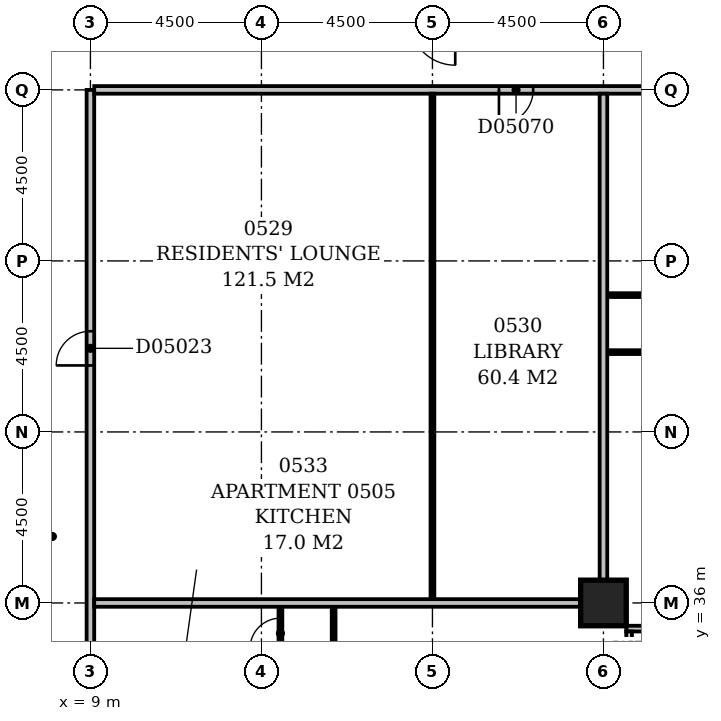
"""IFC4 building model, lengths in metres.
Left out: names, types, materials, properties, quantities, classifications, styles, units other than length and angle.
Written with IfcOpenShell. Run it as: python <this file> out.ifc"""

import sys

from ifc_helpers import new_model, si_unit, direction, frame, frame_2d, origin, origin_2d, place, context, subcontext, project, spatial, rectangle, extrude, element, fill, save


model = new_model("IFC4")
c1 = context("Model", 3, precision=1e-05, world=origin(), true_north=direction((0.0, 1.0)))
c2 = subcontext(c1, "Body", "Model", "MODEL_VIEW")
j1 = project(units=[si_unit("LENGTHUNIT", "METRE"), si_unit("PLANEANGLEUNIT", "RADIAN")], contexts=[c1])
p1 = place(None, origin())
s1 = spatial("IfcSite", under=j1, at=p1, CompositionType="ELEMENT")
p2 = place(p1, origin())
s2 = spatial("IfcBuilding", under=s1, at=p2, CompositionType="ELEMENT")
p3 = place(p2, frame((0.0, 0.0, 29.0)))
s3 = spatial("IfcBuildingStorey", under=s2, at=p3, CompositionType="ELEMENT", Elevation=29.0)
p4 = place(p3, frame((22.5, 36.0, -0.3), z_axis=(0.0, 0.0, 1.0), x_axis=(1.0, 0.0, 0.0)))
e1 = element("IfcColumn", 1, at=p4, inside=s3, PredefinedType="COLUMN", context=c2, shape_type="SweptSolid", body=[
    extrude(rectangle(XDim=1.2, YDim=1.2, at=origin_2d()), origin(), (0.0, 0.0, 1.0), 3.6),
])
p5 = place(p3, frame((23.175, 17.4, 0.0), z_axis=(0.0, 0.0, 1.0), x_axis=(0.0, 1.0, 0.0)))
e2 = element("IfcWall", 2, at=p5, inside=s3, PredefinedType="STANDARD", context=c2, shape_type="SweptSolid", body=[
    extrude(rectangle(XDim=17.85, YDim=0.15, at=frame_2d((8.925, 0.0))), origin(), (0.0, 0.0, 1.0), 2.7),
])
p6 = place(p5, frame((1.65, 0.0, 0.6)))
e3 = element("IfcOpeningElement", 3, at=p6, cuts=e2, PredefinedType="OPENING", context=c2, shape_type="SweptSolid", body=[
    extrude(rectangle(XDim=2.4, YDim=1.8, at=frame_2d((1.2, 0.9))), frame((0.0, 0.087, 0.0), z_axis=(0.0, -1.0, 0.0), x_axis=(1.0, 0.0, 0.0)), (0.0, 0.0, 1.0), 0.174),
])
p7 = place(p5, frame((6.15, 0.0, 0.6)))
e4 = element("IfcOpeningElement", 4, at=p7, cuts=e2, PredefinedType="OPENING", context=c2, shape_type="SweptSolid", body=[
    extrude(rectangle(XDim=2.4, YDim=1.8, at=frame_2d((1.2, 0.9))), frame((0.0, 0.087, 0.0), z_axis=(0.0, -1.0, 0.0), x_axis=(1.0, 0.0, 0.0)), (0.0, 0.0, 1.0), 0.174),
])
p8 = place(p5, frame((10.65, 0.0, 0.6)))
e5 = element("IfcOpeningElement", 5, at=p8, cuts=e2, PredefinedType="OPENING", context=c2, shape_type="SweptSolid", body=[
    extrude(rectangle(XDim=2.4, YDim=1.8, at=frame_2d((1.2, 0.9))), frame((0.0, 0.087, 0.0), z_axis=(0.0, -1.0, 0.0), x_axis=(1.0, 0.0, 0.0)), (0.0, 0.0, 1.0), 0.174),
])
p9 = place(p5, frame((17.138, 0.0, 0.6)))
e6 = element("IfcOpeningElement", 6, at=p9, cuts=e2, PredefinedType="OPENING", context=c2, shape_type="SweptSolid", body=[
    extrude(rectangle(XDim=0.45, YDim=1.8, at=frame_2d((0.225, 0.9))), frame((0.0, 0.087, 0.0), z_axis=(0.0, -1.0, 0.0), x_axis=(1.0, 0.0, 0.0)), (0.0, 0.0, 1.0), 0.174),
])
p10 = place(p3, frame((23.1, 35.325, 0.0), z_axis=(0.0, 0.0, 1.0), x_axis=(1.0, 0.0, 0.0)))
e7 = element("IfcWall", 7, at=p10, inside=s3, PredefinedType="STANDARD", context=c2, shape_type="SweptSolid", body=[
    extrude(rectangle(XDim=45.15, YDim=0.15, at=frame_2d((22.575, 0.0))), origin(), (0.0, 0.0, 1.0), 2.7),
])
p11 = place(p10, frame((0.45, 0.0, 0.6)))
e8 = element("IfcOpeningElement", 8, at=p11, cuts=e7, PredefinedType="OPENING", context=c2, shape_type="SweptSolid", body=[
    extrude(rectangle(XDim=2.4, YDim=1.8, at=frame_2d((1.2, 0.9))), frame((0.0, 0.087, 0.0), z_axis=(0.0, -1.0, 0.0), x_axis=(1.0, 0.0, 0.0)), (0.0, 0.0, 1.0), 0.174),
])
p12 = place(p10, frame((4.95, 0.0, 0.6)))
e9 = element("IfcOpeningElement", 9, at=p12, cuts=e7, PredefinedType="OPENING", context=c2, shape_type="SweptSolid", body=[
    extrude(rectangle(XDim=2.4, YDim=1.8, at=frame_2d((1.2, 0.9))), frame((0.0, 0.087, 0.0), z_axis=(0.0, -1.0, 0.0), x_axis=(1.0, 0.0, 0.0)), (0.0, 0.0, 1.0), 0.174),
])
p13 = place(p10, frame((9.25, 0.0, 0.6)))
e10 = element("IfcOpeningElement", 10, at=p13, cuts=e7, PredefinedType="OPENING", context=c2, shape_type="SweptSolid", body=[
    extrude(rectangle(XDim=1.5, YDim=1.8, at=frame_2d((0.75, 0.9))), frame((0.0, 0.087, 0.0), z_axis=(0.0, -1.0, 0.0), x_axis=(1.0, 0.0, 0.0)), (0.0, 0.0, 1.0), 0.174),
])
p14 = place(p10, frame((15.277, 0.0, 0.6)))
e11 = element("IfcOpeningElement", 11, at=p14, cuts=e7, PredefinedType="OPENING", context=c2, shape_type="SweptSolid", body=[
    extrude(rectangle(XDim=1.2, YDim=1.8, at=frame_2d((0.6, 0.9))), frame((0.0, 0.087, 0.0), z_axis=(0.0, -1.0, 0.0), x_axis=(1.0, 0.0, 0.0)), (0.0, 0.0, 1.0), 0.174),
])
p15 = place(p10, frame((18.45, 0.0, 0.6)))
e12 = element("IfcOpeningElement", 12, at=p15, cuts=e7, PredefinedType="OPENING", context=c2, shape_type="SweptSolid", body=[
    extrude(rectangle(XDim=2.4, YDim=1.8, at=frame_2d((1.2, 0.9))), frame((0.0, 0.087, 0.0), z_axis=(0.0, -1.0, 0.0), x_axis=(1.0, 0.0, 0.0)), (0.0, 0.0, 1.0), 0.174),
])
p16 = place(p10, frame((22.95, 0.0, 0.6)))
e13 = element("IfcOpeningElement", 13, at=p16, cuts=e7, PredefinedType="OPENING", context=c2, shape_type="SweptSolid", body=[
    extrude(rectangle(XDim=2.4, YDim=1.8, at=frame_2d((1.2, 0.9))), frame((0.0, 0.087, 0.0), z_axis=(0.0, -1.0, 0.0), x_axis=(1.0, 0.0, 0.0)), (0.0, 0.0, 1.0), 0.174),
])
p17 = place(p10, frame((27.45, 0.0, 0.6)))
e14 = element("IfcOpeningElement", 14, at=p17, cuts=e7, PredefinedType="OPENING", context=c2, shape_type="SweptSolid", body=[
    extrude(rectangle(XDim=2.4, YDim=1.8, at=frame_2d((1.2, 0.9))), frame((0.0, 0.087, 0.0), z_axis=(0.0, -1.0, 0.0), x_axis=(1.0, 0.0, 0.0)), (0.0, 0.0, 1.0), 0.174),
])
p18 = place(p10, frame((31.95, 0.0, 0.6)))
e15 = element("IfcOpeningElement", 15, at=p18, cuts=e7, PredefinedType="OPENING", context=c2, shape_type="SweptSolid", body=[
    extrude(rectangle(XDim=2.4, YDim=1.8, at=frame_2d((1.2, 0.9))), frame((0.0, 0.087, 0.0), z_axis=(0.0, -1.0, 0.0), x_axis=(1.0, 0.0, 0.0)), (0.0, 0.0, 1.0), 0.174),
])
p19 = place(p10, frame((36.45, 0.0, 0.6)))
e16 = element("IfcOpeningElement", 16, at=p19, cuts=e7, PredefinedType="OPENING", context=c2, shape_type="SweptSolid", body=[
    extrude(rectangle(XDim=2.4, YDim=1.8, at=frame_2d((1.2, 0.9))), frame((0.0, 0.087, 0.0), z_axis=(0.0, -1.0, 0.0), x_axis=(1.0, 0.0, 0.0)), (0.0, 0.0, 1.0), 0.174),
])
p20 = place(p10, frame((40.797, 0.0, 0.6)))
e17 = element("IfcOpeningElement", 17, at=p20, cuts=e7, PredefinedType="OPENING", context=c2, shape_type="SweptSolid", body=[
    extrude(rectangle(XDim=0.6, YDim=1.8, at=frame_2d((0.3, 0.9))), frame((0.0, 0.087, 0.0), z_axis=(0.0, -1.0, 0.0), x_axis=(1.0, 0.0, 0.0)), (0.0, 0.0, 1.0), 0.174),
])
p21 = place(p3, frame((9.0, 5.0, 0.0), z_axis=(0.0, 0.0, 1.0), x_axis=(0.0, 1.0, 0.0)))
e18 = element("IfcWall", 18, at=p21, inside=s3, PredefinedType="PARTITIONING", context=c2, shape_type="SweptSolid", body=[
    extrude(rectangle(XDim=44.5, YDim=0.2, at=frame_2d((22.25, 0.0))), origin(), (0.0, 0.0, 1.0), 3.3),
])
p22 = place(p21, frame((24.7, 0.0, 0.0)))
e19 = element("IfcOpeningElement", 19, at=p22, cuts=e18, PredefinedType="OPENING", context=c2, shape_type="SweptSolid", body=[
    extrude(rectangle(XDim=1.0, YDim=2.1, at=frame_2d((0.5, 1.05))), frame((0.0, 0.112, 0.0), z_axis=(0.0, -1.0, 0.0), x_axis=(1.0, 0.0, 0.0)), (0.0, 0.0, 1.0), 0.224),
])
p23 = place(p21, frame((13.3, 0.0, 0.0)))
e20 = element("IfcOpeningElement", 20, at=p23, cuts=e18, PredefinedType="OPENING", context=c2, shape_type="SweptSolid", body=[
    extrude(rectangle(XDim=1.0, YDim=2.1, at=frame_2d((0.5, 1.05))), frame((0.0, 0.112, 0.0), z_axis=(0.0, -1.0, 0.0), x_axis=(1.0, 0.0, 0.0)), (0.0, 0.0, 1.0), 0.224),
])
p24 = place(p21, frame((10.45, 0.0, 0.0)))
e21 = element("IfcOpeningElement", 21, at=p24, cuts=e18, PredefinedType="OPENING", context=c2, shape_type="SweptSolid", body=[
    extrude(rectangle(XDim=1.0, YDim=2.1, at=frame_2d((0.5, 1.05))), frame((0.0, 0.112, 0.0), z_axis=(0.0, -1.0, 0.0), x_axis=(1.0, 0.0, 0.0)), (0.0, 0.0, 1.0), 0.224),
])
p25 = place(p21, frame((5.95, 0.0, 0.0)))
e22 = element("IfcOpeningElement", 22, at=p25, cuts=e18, PredefinedType="OPENING", context=c2, shape_type="SweptSolid", body=[
    extrude(rectangle(XDim=1.0, YDim=2.1, at=frame_2d((0.5, 1.05))), frame((0.0, 0.112, 0.0), z_axis=(0.0, -1.0, 0.0), x_axis=(1.0, 0.0, 0.0)), (0.0, 0.0, 1.0), 0.224),
])
p26 = place(p21, frame((37.25, 0.0, 0.0)))
e23 = element("IfcOpeningElement", 23, at=p26, cuts=e18, PredefinedType="OPENING", context=c2, shape_type="SweptSolid", body=[
    extrude(rectangle(XDim=0.9, YDim=2.1, at=frame_2d((0.45, 1.05))), frame((0.0, 0.112, 0.0), z_axis=(0.0, -1.0, 0.0), x_axis=(1.0, 0.0, 0.0)), (0.0, 0.0, 1.0), 0.224),
])
p27 = place(p21, frame((1.5, 0.0, 0.0)))
e24 = element("IfcOpeningElement", 24, at=p27, cuts=e18, PredefinedType="OPENING", context=c2, shape_type="SweptSolid", body=[
    extrude(rectangle(XDim=0.9, YDim=2.1, at=frame_2d((0.45, 1.05))), frame((0.0, 0.112, 0.0), z_axis=(0.0, -1.0, 0.0), x_axis=(1.0, 0.0, 0.0)), (0.0, 0.0, 1.0), 0.224),
])
p28 = place(p3, frame((15.4, 27.1, 0.0), z_axis=(0.0, 0.0, 1.0), x_axis=(0.0, 1.0, 0.0)))
e25 = element("IfcWall", 25, at=p28, inside=s3, PredefinedType="PARTITIONING", context=c2, shape_type="SweptSolid", body=[
    extrude(rectangle(XDim=8.8, YDim=0.1, at=frame_2d((4.4, 0.0))), origin(), (0.0, 0.0, 1.0), 3.3),
])
p29 = place(p28, frame((1.7, 0.0, 0.0)))
e26 = element("IfcOpeningElement", 26, at=p29, cuts=e25, PredefinedType="OPENING", context=c2, shape_type="SweptSolid", body=[
    extrude(rectangle(XDim=0.9, YDim=2.1, at=frame_2d((0.45, 1.05))), frame((0.0, 0.062, 0.0), z_axis=(0.0, -1.0, 0.0), x_axis=(1.0, 0.0, 0.0)), (0.0, 0.0, 1.0), 0.124),
])
p30 = place(p28, frame((6.2, 0.0, 0.0)))
e27 = element("IfcOpeningElement", 27, at=p30, cuts=e25, PredefinedType="OPENING", context=c2, shape_type="SweptSolid", body=[
    extrude(rectangle(XDim=0.9, YDim=2.1, at=frame_2d((0.45, 1.05))), frame((0.0, 0.062, 0.0), z_axis=(0.0, -1.0, 0.0), x_axis=(1.0, 0.0, 0.0)), (0.0, 0.0, 1.0), 0.124),
])
p31 = place(p3, frame((14.0, 31.0, 0.0), z_axis=(0.0, 0.0, 1.0), x_axis=(0.0, 1.0, 0.0)))
e28 = element("IfcWall", 28, at=p31, inside=s3, PredefinedType="PARTITIONING", context=c2, shape_type="SweptSolid", body=[
    extrude(rectangle(XDim=4.9, YDim=0.1, at=frame_2d((2.45, 0.0))), origin(), (0.0, 0.0, 1.0), 3.3),
])
p32 = place(p31, frame((1.25, 0.0, 0.0)))
e29 = element("IfcOpeningElement", 29, at=p32, cuts=e28, PredefinedType="OPENING", context=c2, shape_type="SweptSolid", body=[
    extrude(rectangle(XDim=0.9, YDim=2.1, at=frame_2d((0.45, 1.05))), frame((0.0, 0.062, 0.0), z_axis=(0.0, -1.0, 0.0), x_axis=(1.0, 0.0, 0.0)), (0.0, 0.0, 1.0), 0.124),
])
p33 = place(p31, frame((3.8, 0.0, 0.0)))
e30 = element("IfcOpeningElement", 30, at=p33, cuts=e28, PredefinedType="OPENING", context=c2, shape_type="SweptSolid", body=[
    extrude(rectangle(XDim=0.8, YDim=2.1, at=frame_2d((0.4, 1.05))), frame((0.0, 0.062, 0.0), z_axis=(0.0, -1.0, 0.0), x_axis=(1.0, 0.0, 0.0)), (0.0, 0.0, 1.0), 0.124),
])
p34 = place(p3, frame((9.1, 36.0, 0.0), z_axis=(0.0, 0.0, 1.0), x_axis=(1.0, 0.0, 0.0)))
e31 = element("IfcWall", 31, at=p34, inside=s3, PredefinedType="PARTITIONING", context=c2, shape_type="SweptSolid", body=[
    extrude(rectangle(XDim=12.8, YDim=0.2, at=frame_2d((6.4, 0.0))), origin(), (0.0, 0.0, 1.0), 2.4),
])
p35 = place(p3, frame((18.0, 36.1, 0.0), z_axis=(0.0, 0.0, 1.0), x_axis=(0.0, 1.0, 0.0)))
e32 = element("IfcWall", 32, at=p35, inside=s3, PredefinedType="PARTITIONING", context=c2, shape_type="SweptSolid", body=[
    extrude(rectangle(XDim=13.3, YDim=0.1, at=frame_2d((6.65, 0.0))), origin(), (0.0, 0.0, 1.0), 3.3),
])
p36 = place(p3, frame((22.5, 36.6, 0.0), z_axis=(0.0, 0.0, 1.0), x_axis=(0.0, 1.0, 0.0)))
e33 = element("IfcWall", 33, at=p36, inside=s3, PredefinedType="PARTITIONING", context=c2, shape_type="SweptSolid", body=[
    extrude(rectangle(XDim=12.8, YDim=0.2, at=frame_2d((6.4, 0.0))), origin(), (0.0, 0.0, 1.0), 3.3),
])
p37 = place(p3, frame((22.6, 42.6, 0.0), z_axis=(0.0, 0.0, 1.0), x_axis=(1.0, 0.0, 0.0)))
e34 = element("IfcWall", 34, at=p37, inside=s3, PredefinedType="PARTITIONING", context=c2, shape_type="SweptSolid", body=[
    extrude(rectangle(XDim=17.8, YDim=0.1, at=frame_2d((8.9, 0.0))), origin(), (0.0, 0.0, 1.0), 3.3),
])
p38 = place(p37, frame((3.9, 0.0, 0.0)))
e35 = element("IfcOpeningElement", 35, at=p38, cuts=e34, PredefinedType="OPENING", context=c2, shape_type="SweptSolid", body=[
    extrude(rectangle(XDim=0.9, YDim=2.1, at=frame_2d((0.45, 1.05))), frame((0.0, 0.062, 0.0), z_axis=(0.0, -1.0, 0.0), x_axis=(1.0, 0.0, 0.0)), (0.0, 0.0, 1.0), 0.124),
])
p39 = place(p37, frame((10.7, 0.0, 0.0)))
e36 = element("IfcOpeningElement", 36, at=p39, cuts=e34, PredefinedType="OPENING", context=c2, shape_type="SweptSolid", body=[
    extrude(rectangle(XDim=0.9, YDim=2.1, at=frame_2d((0.45, 1.05))), frame((0.0, 0.062, 0.0), z_axis=(0.0, -1.0, 0.0), x_axis=(1.0, 0.0, 0.0)), (0.0, 0.0, 1.0), 0.124),
])
p40 = place(p37, frame((14.05, 0.0, 0.0)))
e37 = element("IfcOpeningElement", 37, at=p40, cuts=e34, PredefinedType="OPENING", context=c2, shape_type="SweptSolid", body=[
    extrude(rectangle(XDim=0.9, YDim=2.1, at=frame_2d((0.45, 1.05))), frame((0.0, 0.062, 0.0), z_axis=(0.0, -1.0, 0.0), x_axis=(1.0, 0.0, 0.0)), (0.0, 0.0, 1.0), 0.124),
])
p41 = place(p3, frame((22.6, 44.1, 0.0), z_axis=(0.0, 0.0, 1.0), x_axis=(1.0, 0.0, 0.0)))
e38 = element("IfcWall", 38, at=p41, inside=s3, PredefinedType="PARTITIONING", context=c2, shape_type="SweptSolid", body=[
    extrude(rectangle(XDim=6.75, YDim=0.1, at=frame_2d((3.375, 0.0))), origin(), (0.0, 0.0, 1.0), 3.3),
])
p42 = place(p41, frame((2.9, 0.0, 0.0)))
e39 = element("IfcOpeningElement", 39, at=p42, cuts=e38, PredefinedType="OPENING", context=c2, shape_type="SweptSolid", body=[
    extrude(rectangle(XDim=0.9, YDim=2.1, at=frame_2d((0.45, 1.05))), frame((0.0, 0.062, 0.0), z_axis=(0.0, -1.0, 0.0), x_axis=(1.0, 0.0, 0.0)), (0.0, 0.0, 1.0), 0.124),
])
p43 = place(p3, frame((9.1, 49.5, 0.0), z_axis=(0.0, 0.0, 1.0), x_axis=(1.0, 0.0, 0.0)))
e40 = element("IfcWall", 40, at=p43, inside=s3, PredefinedType="PARTITIONING", context=c2, shape_type="SweptSolid", body=[
    extrude(rectangle(XDim=57.8, YDim=0.2, at=frame_2d((28.9, 0.0))), origin(), (0.0, 0.0, 1.0), 3.3),
])
p44 = place(p43, frame((20.6, 0.0, 0.0)))
e41 = element("IfcOpeningElement", 41, at=p44, cuts=e40, PredefinedType="OPENING", context=c2, shape_type="SweptSolid", body=[
    extrude(rectangle(XDim=1.0, YDim=2.1, at=frame_2d((0.5, 1.05))), frame((0.0, 0.112, 0.0), z_axis=(0.0, -1.0, 0.0), x_axis=(1.0, 0.0, 0.0)), (0.0, 0.0, 1.0), 0.224),
])
p45 = place(p43, frame((31.7, 0.0, 0.0)))
e42 = element("IfcOpeningElement", 42, at=p45, cuts=e40, PredefinedType="OPENING", context=c2, shape_type="SweptSolid", body=[
    extrude(rectangle(XDim=1.0, YDim=2.1, at=frame_2d((0.5, 1.05))), frame((0.0, 0.112, 0.0), z_axis=(0.0, -1.0, 0.0), x_axis=(1.0, 0.0, 0.0)), (0.0, 0.0, 1.0), 0.224),
])
p46 = place(p43, frame((47.6, 0.0, 0.0)))
e43 = element("IfcOpeningElement", 43, at=p46, cuts=e40, PredefinedType="OPENING", context=c2, shape_type="SweptSolid", body=[
    extrude(rectangle(XDim=1.0, YDim=2.1, at=frame_2d((0.5, 1.05))), frame((0.0, 0.112, 0.0), z_axis=(0.0, -1.0, 0.0), x_axis=(1.0, 0.0, 0.0)), (0.0, 0.0, 1.0), 0.224),
])
p47 = place(p43, frame((54.15, 0.0, 0.0)))
e44 = element("IfcOpeningElement", 44, at=p47, cuts=e40, PredefinedType="OPENING", context=c2, shape_type="SweptSolid", body=[
    extrude(rectangle(XDim=1.0, YDim=2.1, at=frame_2d((0.5, 1.05))), frame((0.0, 0.112, 0.0), z_axis=(0.0, -1.0, 0.0), x_axis=(1.0, 0.0, 0.0)), (0.0, 0.0, 1.0), 0.224),
])
p48 = place(p43, frame((10.65, 0.0, 0.0)))
e45 = element("IfcOpeningElement", 45, at=p48, cuts=e40, PredefinedType="OPENING", context=c2, shape_type="SweptSolid", body=[
    extrude(rectangle(XDim=0.9, YDim=2.1, at=frame_2d((0.45, 1.05))), frame((0.0, 0.112, 0.0), z_axis=(0.0, -1.0, 0.0), x_axis=(1.0, 0.0, 0.0)), (0.0, 0.0, 1.0), 0.224),
])
p49 = place(p26, origin())
e46 = element("IfcDoor", 46, at=p49, inside=s3, OperationType="SINGLE_SWING_LEFT", PredefinedType="DOOR", context=c2, shape_type="SweptSolid", body=[
    extrude(rectangle(XDim=0.9, YDim=2.1, at=frame_2d((0.45, 1.05))), frame((0.0, 0.025, 0.0), z_axis=(0.0, -1.0, 0.0), x_axis=(1.0, 0.0, 0.0)), (0.0, 0.0, 1.0), 0.05),
])
fill(e23, e46)
p50 = place(p33, origin())
e47 = element("IfcDoor", 47, at=p50, inside=s3, OperationType="SINGLE_SWING_LEFT", PredefinedType="DOOR", context=c2, shape_type="SweptSolid", body=[
    extrude(rectangle(XDim=0.8, YDim=2.1, at=frame_2d((0.4, 1.05))), frame((0.0, 0.025, 0.0), z_axis=(0.0, -1.0, 0.0), x_axis=(1.0, 0.0, 0.0)), (0.0, 0.0, 1.0), 0.05),
])
fill(e30, e47)
p51 = place(p48, frame((0.9, 0.0, 0.0), z_axis=(0.0, 0.0, 1.0), x_axis=(-1.0, 0.0, 0.0)))
e48 = element("IfcDoor", 48, at=p51, inside=s3, OperationType="SINGLE_SWING_RIGHT", PredefinedType="DOOR", context=c2, shape_type="SweptSolid", body=[
    extrude(rectangle(XDim=0.9, YDim=2.1, at=frame_2d((0.45, 1.05))), frame((0.0, 0.025, 0.0), z_axis=(0.0, -1.0, 0.0), x_axis=(1.0, 0.0, 0.0)), (0.0, 0.0, 1.0), 0.05),
])
fill(e45, e48)
save(model, sys.argv[1])
